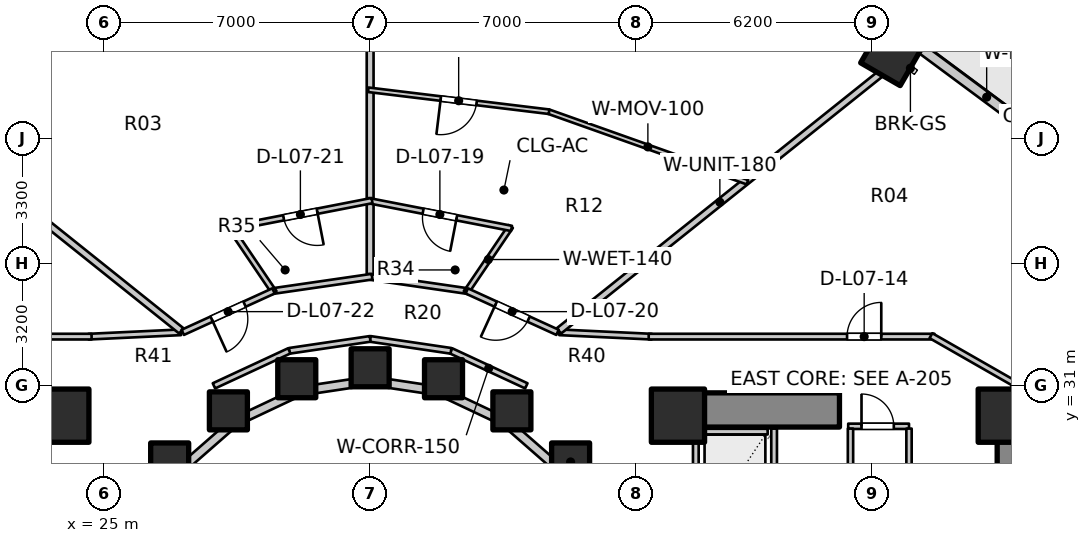
"""IFC4 building model, lengths in metres.
Left out: names, types, materials, properties, quantities, classifications, styles, units other than length and angle.
Written with IfcOpenShell. Run it as: python <this file> out.ifc"""

import sys

from ifc_helpers import new_model, si_unit, direction, frame, frame_2d, origin, origin_2d, place, context, subcontext, project, spatial, rectangle, extrude, element, fill, save


model = new_model("IFC4")
c1 = context("Model", 3, precision=1e-05, world=origin(), true_north=direction((0.0, 1.0)))
c2 = subcontext(c1, "Body", "Model", "MODEL_VIEW")
j1 = project(units=[si_unit("LENGTHUNIT", "METRE"), si_unit("PLANEANGLEUNIT", "RADIAN")], contexts=[c1])
p1 = place(None, origin())
s1 = spatial("IfcSite", under=j1, at=p1, CompositionType="ELEMENT")
p2 = place(p1, origin())
s2 = spatial("IfcBuilding", under=s1, at=p2, CompositionType="ELEMENT")
p3 = place(p2, frame((0.0, 0.0, 27.6)))
s3 = spatial("IfcBuildingStorey", under=s2, at=p3, CompositionType="ELEMENT", Elevation=27.6)
p4 = place(p3, frame((19.65, 30.35, 0.0), z_axis=(0.0, 0.0, 1.0), x_axis=(1.0, 0.0, 0.0)))
e1 = element("IfcWall", 1, at=p4, inside=s3, PredefinedType="SHEAR", context=c2, shape_type="SweptSolid", body=[
    extrude(rectangle(XDim=4.5, YDim=0.9, at=frame_2d((2.25, 0.0))), origin(), (0.0, 0.0, 1.0), 3.1),
])
p5 = place(p3, frame((48.95, 17.05, 0.0), z_axis=(0.0, 0.0, 1.0), x_axis=(0.0, 1.0, 0.0)))
e2 = element("IfcWall", 2, at=p5, inside=s3, PredefinedType="SHEAR", context=c2, shape_type="SweptSolid", body=[
    extrude(rectangle(XDim=12.8, YDim=0.9, at=frame_2d((6.4, 0.0))), origin(), (0.0, 0.0, 1.0), 3.1),
])
p6 = place(p3, frame((39.85, 30.35, 0.0), z_axis=(0.0, 0.0, 1.0), x_axis=(1.0, 0.0, 0.0)))
e3 = element("IfcWall", 3, at=p6, inside=s3, PredefinedType="SHEAR", context=c2, shape_type="SweptSolid", body=[
    extrude(rectangle(XDim=4.5, YDim=0.9, at=frame_2d((2.25, 0.0))), origin(), (0.0, 0.0, 1.0), 3.1),
])
for number, where, z_axis, x_axis in (
    (4, (23.9, 30.2, 0.0), (0.0, 0.0, 1.0), (1.0, 0.0, 0.0)),
    (5, (48.7, 30.2, 0.0), (0.0, 0.0, 1.0), (1.0, 0.0, 0.0)),
    (6, (40.1, 30.2, 0.0), (0.0, 0.0, 1.0), (1.0, 0.0, 0.0)),
):
    element("IfcColumn", number, at=place(p3, frame(where, z_axis=z_axis, x_axis=x_axis)), inside=s3, PredefinedType="COLUMN", context=c2, shape_type="SweptSolid", body=[
        extrude(rectangle(XDim=1.4, YDim=1.4, at=origin_2d()), origin(), (0.0, 0.0, 1.0), 3.1),
    ])
for number, where, z_axis, x_axis in (
    (7, (37.275, 28.982, 0.0), (0.0, 0.0, 1.0), (1.0, 0.0, 0.0)),
    (8, (35.73, 30.327, 0.0), (0.0, 0.0, 1.0), (1.0, 0.0, 0.0)),
):
    element("IfcColumn", number, at=place(p3, frame(where, z_axis=z_axis, x_axis=x_axis)), inside=s3, PredefinedType="COLUMN", context=c2, shape_type="SweptSolid", body=[
        extrude(rectangle(XDim=1.0, YDim=1.0, at=origin_2d()), origin(), (0.0, 0.0, 1.0), 3.1),
    ])
p7 = place(p3, frame((45.727, 39.704, 0.0), z_axis=(0.0, 0.0, 1.0), x_axis=(0.5, 0.866025403784, 0.0)))
e9 = element("IfcColumn", 9, at=p7, inside=s3, PredefinedType="COLUMN", context=c2, shape_type="SweptSolid", body=[
    extrude(rectangle(XDim=1.2, YDim=1.2, at=origin_2d()), origin(), (0.0, 0.0, 1.0), 3.1),
])
for number, where, z_axis, x_axis in (
    (10, (33.931, 31.172, 0.0), (0.0, 0.0, 1.0), (1.0, 0.0, 0.0)),
    (11, (32.0, 31.46, 0.0), (0.0, 0.0, 1.0), (1.0, 0.0, 0.0)),
    (12, (30.069, 31.172, 0.0), (0.0, 0.0, 1.0), (1.0, 0.0, 0.0)),
    (13, (28.27, 30.327, 0.0), (0.0, 0.0, 1.0), (1.0, 0.0, 0.0)),
    (14, (26.725, 28.982, 0.0), (0.0, 0.0, 1.0), (1.0, 0.0, 0.0)),
):
    element("IfcColumn", number, at=place(p3, frame(where, z_axis=z_axis, x_axis=x_axis)), inside=s3, PredefinedType="COLUMN", context=c2, shape_type="SweptSolid", body=[
        extrude(rectangle(XDim=1.0, YDim=1.0, at=origin_2d()), origin(), (0.0, 0.0, 1.0), 3.1),
    ])
p8 = place(p3, frame((37.035, 28.742, 0.0), z_axis=(0.0, 0.0, 1.0), x_axis=(-0.752576694707, 0.658504607869, 0.0)))
e15 = element("IfcWall", 15, at=p8, inside=s3, PredefinedType="STANDARD", context=c2, shape_type="SweptSolid", body=[
    extrude(rectangle(XDim=1.959, YDim=0.23, at=frame_2d((0.98, 0.0))), origin(), (0.0, 0.0, 1.0), 2.16),
])
p9 = place(p3, frame((35.56, 30.032, 0.0), z_axis=(0.0, 0.0, 1.0), x_axis=(-0.904179699603, 0.427152280606, 0.0)))
e16 = element("IfcWall", 16, at=p9, inside=s3, PredefinedType="STANDARD", context=c2, shape_type="SweptSolid", body=[
    extrude(rectangle(XDim=1.899, YDim=0.23, at=frame_2d((0.95, 0.0))), origin(), (0.0, 0.0, 1.0), 2.16),
])
for number, where, z_axis, x_axis in (
    (17, (33.843, 30.843, 0.0), (0.0, 0.0, 1.0), (-0.989, 0.149, 0.0)),
    (18, (32.0, 31.12, 0.0), (0.0, 0.0, 1.0), (-0.989, -0.149, 0.0)),
):
    element("IfcWall", number, at=place(p3, frame(where, z_axis=z_axis, x_axis=x_axis)), inside=s3, PredefinedType="STANDARD", context=c2, shape_type="SweptSolid", body=[
        extrude(rectangle(XDim=1.864, YDim=0.23, at=frame_2d((0.932, 0.0))), origin(), (0.0, 0.0, 1.0), 2.16),
    ])
p10 = place(p3, frame((30.157, 30.843, 0.0), z_axis=(0.0, 0.0, 1.0), x_axis=(-0.904179699603, -0.427152280606, 0.0)))
e19 = element("IfcWall", 19, at=p10, inside=s3, PredefinedType="STANDARD", context=c2, shape_type="SweptSolid", body=[
    extrude(rectangle(XDim=1.899, YDim=0.23, at=frame_2d((0.95, 0.0))), origin(), (0.0, 0.0, 1.0), 2.16),
])
p11 = place(p3, frame((28.44, 30.032, 0.0), z_axis=(0.0, 0.0, 1.0), x_axis=(-0.752576694707, -0.658504607869, 0.0)))
e20 = element("IfcWall", 20, at=p11, inside=s3, PredefinedType="STANDARD", context=c2, shape_type="SweptSolid", body=[
    extrude(rectangle(XDim=1.959, YDim=0.23, at=frame_2d((0.98, 0.0))), origin(), (0.0, 0.0, 1.0), 2.16),
])
p12 = place(p3, frame((50.405, 36.965, 0.0), z_axis=(0.0, 0.0, 1.0), x_axis=(-0.803477531792, 0.595335078679, 0.0)))
e21 = element("IfcWall", 21, at=p12, inside=s3, PredefinedType="STANDARD", context=c2, shape_type="SweptSolid", body=[
    extrude(rectangle(XDim=5.43, YDim=0.26, at=frame_2d((2.715, 0.0))), origin(), (0.0, 0.0, 1.0), 2.85),
])
p13 = place(p3, frame((40.74, 29.78, 0.0), z_axis=(0.0, 0.0, 1.0), x_axis=(1.0, 0.0, 0.0)))
e22 = element("IfcWall", 22, at=p13, inside=s3, PredefinedType="SOLIDWALL", context=c2, shape_type="SweptSolid", body=[
    extrude(rectangle(XDim=1.72, YDim=0.15, at=frame_2d((0.86, 0.0))), origin(), (0.0, 0.0, 1.0), 2.855),
])
for number, where, z_axis, x_axis in (
    (23, (40.57, 27.14, 0.0), (0.0, 0.0, 1.0), (0.0, 1.0, 0.0)),
    (24, (42.63, 27.14, 0.0), (0.0, 0.0, 1.0), (0.0, 1.0, 0.0)),
):
    element("IfcWall", number, at=place(p3, frame(where, z_axis=z_axis, x_axis=x_axis)), inside=s3, PredefinedType="SOLIDWALL", context=c2, shape_type="SweptSolid", body=[
        extrude(rectangle(XDim=2.72, YDim=0.15, at=frame_2d((1.36, 0.0))), origin(), (0.0, 0.0, 1.0), 2.855),
    ])
p14 = place(p3, frame((44.58, 29.92, 0.0), z_axis=(0.0, 0.0, 1.0), x_axis=(1.0, 0.0, 0.0)))
e25 = element("IfcWall", 25, at=p14, inside=s3, PredefinedType="PLUMBINGWALL", context=c2, shape_type="SweptSolid", body=[
    extrude(rectangle(XDim=1.6, YDim=0.14, at=frame_2d((0.8, 0.0))), origin(), (0.0, 0.0, 1.0), 2.855),
])
p15 = place(p14, frame((0.35, 0.0, 0.0)))
e26 = element("IfcOpeningElement", 26, at=p15, cuts=e25, PredefinedType="OPENING", context=c2, shape_type="SweptSolid", body=[
    extrude(rectangle(XDim=0.85, YDim=2.05, at=frame_2d((0.425, 1.025))), frame((0.0, 0.08, 0.0), z_axis=(0.0, -1.0, 0.0), x_axis=(1.0, 0.0, 0.0)), (0.0, 0.0, 1.0), 0.16),
])
for number, where, z_axis, x_axis in (
    (27, (44.64, 25.98, 0.0), (0.0, 0.0, 1.0), (0.0, 1.0, 0.0)),
    (28, (46.18, 25.98, 0.0), (0.0, 0.0, 1.0), (0.0, 1.0, 0.0)),
):
    element("IfcWall", number, at=place(p3, frame(where, z_axis=z_axis, x_axis=x_axis)), inside=s3, PredefinedType="PLUMBINGWALL", context=c2, shape_type="SweptSolid", body=[
        extrude(rectangle(XDim=3.88, YDim=0.14, at=frame_2d((1.94, 0.0))), origin(), (0.0, 0.0, 1.0), 2.855),
    ])
p16 = place(p3, frame((36.11, 30.985, 0.0), z_axis=(0.0, 0.0, 1.0), x_axis=(-0.906943449489, 0.421252393975, 0.0)))
e29 = element("IfcWall", 29, at=p16, inside=s3, PredefinedType="PARTITIONING", context=c2, shape_type="SweptSolid", body=[
    extrude(rectangle(XDim=2.186, YDim=0.15, at=frame_2d((1.093, 0.0))), origin(), (0.0, 0.0, 1.0), 2.237),
])
for number, where, z_axis, x_axis in (
    (30, (34.127, 31.906, 0.0), (0.0, 0.0, 1.0), (-0.989, 0.146, 0.0)),
    (31, (32.0, 32.22, 0.0), (0.0, 0.0, 1.0), (-0.989, -0.146, 0.0)),
):
    element("IfcWall", number, at=place(p3, frame(where, z_axis=z_axis, x_axis=x_axis)), inside=s3, PredefinedType="PARTITIONING", context=c2, shape_type="SweptSolid", body=[
        extrude(rectangle(XDim=2.151, YDim=0.15, at=frame_2d((1.075, 0.0))), origin(), (0.0, 0.0, 1.0), 2.237),
    ])
p17 = place(p3, frame((29.873, 31.906, 0.0), z_axis=(0.0, 0.0, 1.0), x_axis=(-0.906943449489, -0.421252393975, 0.0)))
e32 = element("IfcWall", 32, at=p17, inside=s3, PredefinedType="PARTITIONING", context=c2, shape_type="SweptSolid", body=[
    extrude(rectangle(XDim=2.186, YDim=0.15, at=frame_2d((1.093, 0.0))), origin(), (0.0, 0.0, 1.0), 2.237),
])
p18 = place(p3, frame((36.98, 32.394, 0.0), z_axis=(0.0, 0.0, 1.0), x_axis=(0.998877427952, -0.047369651964, 0.0)))
e33 = element("IfcWall", 33, at=p18, inside=s3, PredefinedType="PARTITIONING", context=c2, shape_type="SweptSolid", body=[
    extrude(rectangle(XDim=2.433, YDim=0.15, at=frame_2d((1.216, 0.0))), origin(), (0.0, 0.0, 1.0), 2.237),
])
p19 = place(p3, frame((39.33, 32.28, 0.0), z_axis=(0.0, 0.0, 1.0), x_axis=(1.0, 0.0, 0.0)))
e34 = element("IfcWall", 34, at=p19, inside=s3, PredefinedType="PARTITIONING", context=c2, shape_type="SweptSolid", body=[
    extrude(rectangle(XDim=7.52, YDim=0.15, at=frame_2d((3.76, 0.0))), origin(), (0.0, 0.0, 1.0), 2.237),
])
p20 = place(p19, frame((5.22, 0.0, 0.0)))
e35 = element("IfcOpeningElement", 35, at=p20, cuts=e34, PredefinedType="OPENING", context=c2, shape_type="SweptSolid", body=[
    extrude(rectangle(XDim=0.9, YDim=2.1, at=frame_2d((0.45, 1.05))), frame((0.0, 0.085, 0.0), z_axis=(0.0, -1.0, 0.0), x_axis=(1.0, 0.0, 0.0)), (0.0, 0.0, 1.0), 0.17),
])
p21 = place(p3, frame((46.757, 32.305, 0.0), z_axis=(0.0, 0.0, 1.0), x_axis=(0.867991349648, -0.496579315857, 0.0)))
e36 = element("IfcWall", 36, at=p21, inside=s3, PredefinedType="PARTITIONING", context=c2, shape_type="SweptSolid", body=[
    extrude(rectangle(XDim=2.567, YDim=0.15, at=frame_2d((1.283, 0.0))), origin(), (0.0, 0.0, 1.0), 2.069),
])
p22 = place(p3, frame((27.02, 32.394, 0.0), z_axis=(0.0, 0.0, 1.0), x_axis=(-0.998877427952, -0.047369651964, 0.0)))
e37 = element("IfcWall", 37, at=p22, inside=s3, PredefinedType="PARTITIONING", context=c2, shape_type="SweptSolid", body=[
    extrude(rectangle(XDim=2.433, YDim=0.15, at=frame_2d((1.216, 0.0))), origin(), (0.0, 0.0, 1.0), 2.237),
])
p23 = place(p3, frame((17.15, 32.28, 0.0), z_axis=(0.0, 0.0, 1.0), x_axis=(1.0, 0.0, 0.0)))
e38 = element("IfcWall", 38, at=p23, inside=s3, PredefinedType="PARTITIONING", context=c2, shape_type="SweptSolid", body=[
    extrude(rectangle(XDim=7.52, YDim=0.15, at=frame_2d((3.76, 0.0))), origin(), (0.0, 0.0, 1.0), 2.237),
])
p24 = place(p23, frame((1.3, 0.0, 0.0)))
e39 = element("IfcOpeningElement", 39, at=p24, cuts=e38, PredefinedType="OPENING", context=c2, shape_type="SweptSolid", body=[
    extrude(rectangle(XDim=0.9, YDim=2.1, at=frame_2d((0.45, 1.05))), frame((0.0, 0.085, 0.0), z_axis=(0.0, -1.0, 0.0), x_axis=(1.0, 0.0, 0.0)), (0.0, 0.0, 1.0), 0.17),
])
p25 = place(p3, frame((36.968, 32.431, 0.0), z_axis=(0.0, 0.0, 1.0), x_axis=(0.781055486744, 0.624461629428, 0.0)))
e40 = element("IfcWall", 40, at=p25, inside=s3, PredefinedType="PARTITIONING", context=c2, shape_type="SweptSolid", body=[
    extrude(rectangle(XDim=10.843, YDim=0.18, at=frame_2d((5.422, 0.0))), origin(), (0.0, 0.0, 1.0), 2.237),
])
p26 = place(p3, frame((32.0, 33.905, 0.0), z_axis=(0.0, 0.0, 1.0), x_axis=(0.0, 1.0, 0.0)))
e41 = element("IfcWall", 41, at=p26, inside=s3, PredefinedType="PARTITIONING", context=c2, shape_type="SweptSolid", body=[
    extrude(rectangle(XDim=8.395, YDim=0.18, at=frame_2d((4.198, 0.0))), origin(), (0.0, 0.0, 1.0), 2.237),
])
p27 = place(p3, frame((27.032, 32.431, 0.0), z_axis=(0.0, 0.0, 1.0), x_axis=(-0.781055486744, 0.624461629428, 0.0)))
e42 = element("IfcWall", 42, at=p27, inside=s3, PredefinedType="PARTITIONING", context=c2, shape_type="SweptSolid", body=[
    extrude(rectangle(XDim=10.843, YDim=0.18, at=frame_2d((5.422, 0.0))), origin(), (0.0, 0.0, 1.0), 2.237),
])
p28 = place(p3, frame((41.928, 36.342, 0.0), z_axis=(0.0, 0.0, 1.0), x_axis=(-0.942369240096, 0.334574678243, 0.0)))
e43 = element("IfcWall", 43, at=p28, inside=s3, PredefinedType="MOVABLE", context=c2, shape_type="SweptSolid", body=[
    extrude(rectangle(XDim=5.559, YDim=0.12, at=frame_2d((2.779, 0.0))), origin(), (0.0, 0.0, 1.0), 2.237),
])
p29 = place(p3, frame((36.708, 38.197, 0.0), z_axis=(0.0, 0.0, 1.0), x_axis=(-0.992699076447, 0.120617343785, 0.0)))
e44 = element("IfcWall", 44, at=p29, inside=s3, PredefinedType="MOVABLE", context=c2, shape_type="SweptSolid", body=[
    extrude(rectangle(XDim=4.793, YDim=0.12, at=frame_2d((2.396, 0.0))), origin(), (0.0, 0.0, 1.0), 2.237),
])
p30 = place(p29, frame((1.922, 0.0, 0.0)))
e45 = element("IfcOpeningElement", 45, at=p30, cuts=e44, PredefinedType="OPENING", context=c2, shape_type="SweptSolid", body=[
    extrude(rectangle(XDim=0.95, YDim=2.1, at=frame_2d((0.475, 1.05))), frame((0.0, 0.07, 0.0), z_axis=(0.0, -1.0, 0.0), x_axis=(1.0, 0.0, 0.0)), (0.0, 0.0, 1.0), 0.14),
])
p31 = place(p3, frame((34.599, 33.473, 0.0), z_axis=(0.0, 0.0, 1.0), x_axis=(-0.989649898776, 0.143502884474, 0.0)))
e46 = element("IfcWall", 46, at=p31, inside=s3, PredefinedType="PARTITIONING", context=c2, shape_type="SweptSolid", body=[
    extrude(rectangle(XDim=2.676, YDim=0.15, at=frame_2d((1.338, 0.0))), origin(), (0.0, 0.0, 1.0), 2.237),
])
p32 = place(p3, frame((34.521, 33.439, 0.0), z_axis=(0.0, 0.0, 1.0), x_axis=(0.56056273171, 0.828111963335, 0.0)))
e47 = element("IfcWall", 47, at=p32, inside=s3, PredefinedType="PLUMBINGWALL", context=c2, shape_type="SweptSolid", body=[
    extrude(rectangle(XDim=2.1, YDim=0.14, at=frame_2d((1.05, 0.0))), origin(), (0.0, 0.0, 1.0), 2.855),
])
p33 = place(p3, frame((35.72, 35.127, 0.0), z_axis=(0.0, 0.0, 1.0), x_axis=(-0.981623000654, 0.190830512727, 0.0)))
e48 = element("IfcWall", 48, at=p33, inside=s3, PredefinedType="PLUMBINGWALL", context=c2, shape_type="SweptSolid", body=[
    extrude(rectangle(XDim=3.839, YDim=0.14, at=frame_2d((1.92, 0.0))), origin(), (0.0, 0.0, 1.0), 2.237),
])
p34 = place(p33, frame((1.47, 0.0, 0.0)))
e49 = element("IfcOpeningElement", 49, at=p34, cuts=e48, PredefinedType="OPENING", context=c2, shape_type="SweptSolid", body=[
    extrude(rectangle(XDim=0.9, YDim=2.1, at=frame_2d((0.45, 1.05))), frame((0.0, 0.08, 0.0), z_axis=(0.0, -1.0, 0.0), x_axis=(1.0, 0.0, 0.0)), (0.0, 0.0, 1.0), 0.16),
])
p35 = place(p3, frame((36.931, 32.393, 0.0), z_axis=(0.0, 0.0, 1.0), x_axis=(-0.909747571199, 0.415161843982, 0.0)))
e50 = element("IfcWall", 50, at=p35, inside=s3, PredefinedType="PARTITIONING", context=c2, shape_type="SweptSolid", body=[
    extrude(rectangle(XDim=2.625, YDim=0.15, at=frame_2d((1.312, 0.0))), origin(), (0.0, 0.0, 1.0), 2.237),
])
p36 = place(p35, frame((0.838, 0.0, 0.0)))
e51 = element("IfcOpeningElement", 51, at=p36, cuts=e50, PredefinedType="OPENING", context=c2, shape_type="SweptSolid", body=[
    extrude(rectangle(XDim=0.95, YDim=2.1, at=frame_2d((0.475, 1.05))), frame((0.0, 0.085, 0.0), z_axis=(0.0, -1.0, 0.0), x_axis=(1.0, 0.0, 0.0)), (0.0, 0.0, 1.0), 0.17),
])
p37 = place(p3, frame((32.05, 33.857, 0.0), z_axis=(0.0, 0.0, 1.0), x_axis=(-0.989649898776, -0.143502884474, 0.0)))
e52 = element("IfcWall", 52, at=p37, inside=s3, PredefinedType="PARTITIONING", context=c2, shape_type="SweptSolid", body=[
    extrude(rectangle(XDim=2.676, YDim=0.15, at=frame_2d((1.338, 0.0))), origin(), (0.0, 0.0, 1.0), 2.237),
])
p38 = place(p3, frame((29.479, 33.439, 0.0), z_axis=(0.0, 0.0, 1.0), x_axis=(-0.56056273171, 0.828111963335, 0.0)))
e53 = element("IfcWall", 53, at=p38, inside=s3, PredefinedType="PLUMBINGWALL", context=c2, shape_type="SweptSolid", body=[
    extrude(rectangle(XDim=2.1, YDim=0.14, at=frame_2d((1.05, 0.0))), origin(), (0.0, 0.0, 1.0), 2.855),
])
p39 = place(p3, frame((32.049, 35.86, 0.0), z_axis=(0.0, 0.0, 1.0), x_axis=(-0.981623000654, -0.190830512727, 0.0)))
e54 = element("IfcWall", 54, at=p39, inside=s3, PredefinedType="PLUMBINGWALL", context=c2, shape_type="SweptSolid", body=[
    extrude(rectangle(XDim=3.839, YDim=0.14, at=frame_2d((1.92, 0.0))), origin(), (0.0, 0.0, 1.0), 2.237),
])
p40 = place(p39, frame((1.47, 0.0, 0.0)))
e55 = element("IfcOpeningElement", 55, at=p40, cuts=e54, PredefinedType="OPENING", context=c2, shape_type="SweptSolid", body=[
    extrude(rectangle(XDim=0.9, YDim=2.1, at=frame_2d((0.45, 1.05))), frame((0.0, 0.08, 0.0), z_axis=(0.0, -1.0, 0.0), x_axis=(1.0, 0.0, 0.0)), (0.0, 0.0, 1.0), 0.16),
])
p41 = place(p3, frame((29.457, 33.482, 0.0), z_axis=(0.0, 0.0, 1.0), x_axis=(-0.909747571199, -0.415161843982, 0.0)))
e56 = element("IfcWall", 56, at=p41, inside=s3, PredefinedType="PARTITIONING", context=c2, shape_type="SweptSolid", body=[
    extrude(rectangle(XDim=2.625, YDim=0.15, at=frame_2d((1.312, 0.0))), origin(), (0.0, 0.0, 1.0), 2.237),
])
p42 = place(p41, frame((0.838, 0.0, 0.0)))
e57 = element("IfcOpeningElement", 57, at=p42, cuts=e56, PredefinedType="OPENING", context=c2, shape_type="SweptSolid", body=[
    extrude(rectangle(XDim=0.95, YDim=2.1, at=frame_2d((0.475, 1.05))), frame((0.0, 0.085, 0.0), z_axis=(0.0, -1.0, 0.0), x_axis=(1.0, 0.0, 0.0)), (0.0, 0.0, 1.0), 0.17),
])
p43 = place(p15, origin())
e58 = element("IfcDoor", 58, at=p43, inside=s3, OperationType="SINGLE_SWING_LEFT", PredefinedType="DOOR", context=c2, shape_type="SweptSolid", body=[
    extrude(rectangle(XDim=0.85, YDim=2.05, at=frame_2d((0.425, 1.025))), frame((0.0, 0.025, 0.0), z_axis=(0.0, -1.0, 0.0), x_axis=(1.0, 0.0, 0.0)), (0.0, 0.0, 1.0), 0.05),
])
fill(e26, e58)
p44 = place(p20, origin())
e59 = element("IfcDoor", 59, at=p44, inside=s3, OperationType="SINGLE_SWING_RIGHT", PredefinedType="DOOR", context=c2, shape_type="SweptSolid", body=[
    extrude(rectangle(XDim=0.9, YDim=2.1, at=frame_2d((0.45, 1.05))), frame((0.0, 0.025, 0.0), z_axis=(0.0, -1.0, 0.0), x_axis=(1.0, 0.0, 0.0)), (0.0, 0.0, 1.0), 0.05),
])
fill(e35, e59)
p45 = place(p30, origin())
e60 = element("IfcDoor", 60, at=p45, inside=s3, OperationType="SINGLE_SWING_RIGHT", PredefinedType="DOOR", context=c2, shape_type="SweptSolid", body=[
    extrude(rectangle(XDim=0.95, YDim=2.1, at=frame_2d((0.475, 1.05))), frame((0.0, 0.025, 0.0), z_axis=(0.0, -1.0, 0.0), x_axis=(1.0, 0.0, 0.0)), (0.0, 0.0, 1.0), 0.05),
])
fill(e45, e60)
p46 = place(p34, origin())
e61 = element("IfcDoor", 61, at=p46, inside=s3, OperationType="SINGLE_SWING_LEFT", PredefinedType="DOOR", context=c2, shape_type="SweptSolid", body=[
    extrude(rectangle(XDim=0.9, YDim=2.1, at=frame_2d((0.45, 1.05))), frame((0.0, 0.025, 0.0), z_axis=(0.0, -1.0, 0.0), x_axis=(1.0, 0.0, 0.0)), (0.0, 0.0, 1.0), 0.05),
])
fill(e49, e61)
p47 = place(p36, origin())
e62 = element("IfcDoor", 62, at=p47, inside=s3, OperationType="SINGLE_SWING_RIGHT", PredefinedType="DOOR", context=c2, shape_type="SweptSolid", body=[
    extrude(rectangle(XDim=0.95, YDim=2.1, at=frame_2d((0.475, 1.05))), frame((0.0, 0.025, 0.0), z_axis=(0.0, -1.0, 0.0), x_axis=(1.0, 0.0, 0.0)), (0.0, 0.0, 1.0), 0.05),
])
fill(e51, e62)
p48 = place(p40, origin())
e63 = element("IfcDoor", 63, at=p48, inside=s3, OperationType="SINGLE_SWING_LEFT", PredefinedType="DOOR", context=c2, shape_type="SweptSolid", body=[
    extrude(rectangle(XDim=0.9, YDim=2.1, at=frame_2d((0.45, 1.05))), frame((0.0, 0.025, 0.0), z_axis=(0.0, -1.0, 0.0), x_axis=(1.0, 0.0, 0.0)), (0.0, 0.0, 1.0), 0.05),
])
fill(e55, e63)
p49 = place(p42, origin())
e64 = element("IfcDoor", 64, at=p49, inside=s3, OperationType="SINGLE_SWING_RIGHT", PredefinedType="DOOR", context=c2, shape_type="SweptSolid", body=[
    extrude(rectangle(XDim=0.95, YDim=2.1, at=frame_2d((0.475, 1.05))), frame((0.0, 0.025, 0.0), z_axis=(0.0, -1.0, 0.0), x_axis=(1.0, 0.0, 0.0)), (0.0, 0.0, 1.0), 0.05),
])
fill(e57, e64)
save(model, sys.argv[1])
